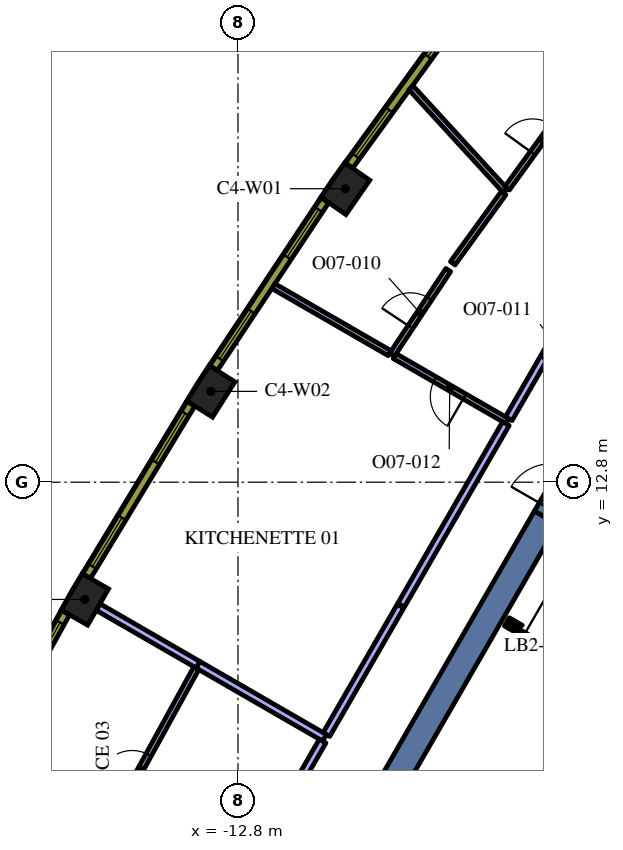
"""IFC4 building model, lengths in metres.
Left out: names, types, materials, properties, quantities, classifications, styles, units other than length and angle.
Written with IfcOpenShell. Run it as: python <this file> out.ifc"""

import sys

from ifc_helpers import new_model, si_unit, direction, frame, frame_2d, origin, origin_2d, place, context, subcontext, project, spatial, polyline, rectangle, outline, extrude, element, fill, save


model = new_model("IFC4")
c1 = context("Model", 3, precision=1e-05, world=origin(), true_north=direction((0.0, 1.0)))
c2 = subcontext(c1, "Body", "Model", "MODEL_VIEW")
j1 = project(units=[si_unit("LENGTHUNIT", "METRE"), si_unit("PLANEANGLEUNIT", "RADIAN")], contexts=[c1])
p1 = place(None, origin())
s1 = spatial("IfcSite", under=j1, at=p1, CompositionType="ELEMENT")
p2 = place(p1, origin())
s2 = spatial("IfcBuilding", under=s1, at=p2, CompositionType="ELEMENT")
p3 = place(p2, frame((0.0, 0.0, 222.6)))
s3 = spatial("IfcBuildingStorey", under=s2, at=p3, CompositionType="ELEMENT", Elevation=222.6)
for number, where, z_axis, x_axis in (
    (1, (-9.975, 20.522, 0.0), (0.0, 0.0, 1.0), (-0.57, -0.822, 0.0)),
    (2, (-13.513, 15.19, 0.0), (0.0, 0.0, 1.0), (-0.536, -0.845, 0.0)),
    (3, (-16.827, 9.715, 0.0), (0.0, 0.0, 1.0), (-0.5, -0.866, 0.0)),
):
    element("IfcColumn", number, at=place(p3, frame(where, z_axis=z_axis, x_axis=x_axis)), inside=s3, PredefinedType="COLUMN", context=c2, shape_type="SweptSolid", body=[
        extrude(rectangle(XDim=1.1, YDim=0.8, at=origin_2d()), origin(), (0.0, 0.0, 1.0), 4.2),
    ])
p4 = place(p3, frame((-12.625, -1.867, 0.0), z_axis=(0.0, 0.0, 1.0), x_axis=(0.500008520515, 0.866020484407, 0.0)))
e4 = element("IfcWall", 4, at=p4, inside=s3, PredefinedType="SOLIDWALL", context=c2, shape_type="SweptSolid", body=[
    extrude(rectangle(XDim=15.859, YDim=0.7, at=frame_2d((7.929, 0.0))), origin(), (0.0, 0.0, 1.0), 4.2),
])
p5 = place(p3, frame((-8.06, -1.311, 0.0), z_axis=(0.0, 0.0, 1.0), x_axis=(0.50000273126, 0.866023826885, 0.0)))
e5 = element("IfcWall", 5, at=p5, inside=s3, PredefinedType="SOLIDWALL", context=c2, shape_type="SweptSolid", body=[
    extrude(rectangle(XDim=10.33, YDim=0.25, at=frame_2d((5.165, 0.0))), origin(), (0.0, 0.0, 1.0), 4.2),
])
p6 = place(p3, frame((-5.725, 9.125, 0.0), z_axis=(0.0, 0.0, 1.0), x_axis=(0.866185586049, -0.49972245349, 0.0)))
e6 = element("IfcWall", 6, at=p6, inside=s3, PredefinedType="SOLIDWALL", context=c2, shape_type="SweptSolid", body=[
    extrude(rectangle(XDim=0.11, YDim=0.25, at=frame_2d((0.055, 0.0))), origin(), (0.0, 0.0, 1.0), 4.2),
])
p7 = place(p3, origin())
e7 = element("IfcWall", 7, at=p7, inside=s3, PredefinedType="SOLIDWALL", context=c2, shape_type="SweptSolid", body=[
    extrude(outline(polyline([(-5.689, 8.96), (-5.69, 8.961), (-5.565, 9.177), (-5.319, 9.035), (-5.335, 9.026), (-5.351, 9.015), (-5.366, 9.002), (-5.379, 8.988), (-5.392, 8.972), (-5.402, 8.956), (-5.412, 8.939), (-5.629, 9.064), (-5.629, 9.064), (-5.689, 8.96)])), origin(), (0.0, 0.0, 1.0), 4.2),
])
p8 = place(p3, frame((-0.898, 6.194, 0.0), z_axis=(0.0, 0.0, 1.0), x_axis=(-0.499996202215, -0.866027596426, 0.0)))
e8 = element("IfcWall", 8, at=p8, inside=s3, PredefinedType="SOLIDWALL", context=c2, shape_type="SweptSolid", body=[
    extrude(rectangle(XDim=9.83, YDim=0.25, at=frame_2d((4.915, 0.0))), origin(), (0.0, 0.0, 1.0), 4.2),
])
p9 = place(p8, frame((0.585, 0.0, 0.0)))
e9 = element("IfcOpeningElement", 9, at=p9, cuts=e8, PredefinedType="OPENING", context=c2, shape_type="SweptSolid", body=[
    extrude(rectangle(XDim=1.1, YDim=2.1, at=frame_2d((0.55, 1.05))), frame((0.0, 0.135, 0.0), z_axis=(0.0, -1.0, 0.0), x_axis=(1.0, 0.0, 0.0)), (0.0, 0.0, 1.0), 0.27),
])
p10 = place(p8, frame((3.105, 0.0, 0.0)))
e10 = element("IfcOpeningElement", 10, at=p10, cuts=e8, PredefinedType="OPENING", context=c2, shape_type="SweptSolid", body=[
    extrude(rectangle(XDim=1.1, YDim=2.1, at=frame_2d((0.55, 1.05))), frame((0.0, 0.135, 0.0), z_axis=(0.0, -1.0, 0.0), x_axis=(1.0, 0.0, 0.0)), (0.0, 0.0, 1.0), 0.27),
])
p11 = place(p8, frame((5.625, 0.0, 0.0)))
e11 = element("IfcOpeningElement", 11, at=p11, cuts=e8, PredefinedType="OPENING", context=c2, shape_type="SweptSolid", body=[
    extrude(rectangle(XDim=1.1, YDim=2.1, at=frame_2d((0.55, 1.05))), frame((0.0, 0.135, 0.0), z_axis=(0.0, -1.0, 0.0), x_axis=(1.0, 0.0, 0.0)), (0.0, 0.0, 1.0), 0.27),
])
p12 = place(p8, frame((8.145, 0.0, 0.0)))
e12 = element("IfcOpeningElement", 12, at=p12, cuts=e8, PredefinedType="OPENING", context=c2, shape_type="SweptSolid", body=[
    extrude(rectangle(XDim=1.1, YDim=2.1, at=frame_2d((0.55, 1.05))), frame((0.0, 0.135, 0.0), z_axis=(0.0, -1.0, 0.0), x_axis=(1.0, 0.0, 0.0)), (0.0, 0.0, 1.0), 0.27),
])
p13 = place(p3, frame((-5.659, 9.012, 0.0), z_axis=(0.0, 0.0, 1.0), x_axis=(0.866009402589, -0.500027713859, 0.0)))
e13 = element("IfcWall", 13, at=p13, inside=s3, PredefinedType="PARTITIONING", context=c2, shape_type="SweptSolid", body=[
    extrude(rectangle(XDim=2.1, YDim=0.12, at=frame_2d((1.05, 0.0))), origin(), (0.0, 0.0, 1.0), 3.45),
])
p14 = place(p13, frame((0.45, 0.0, 0.0)))
e14 = element("IfcOpeningElement", 14, at=p14, cuts=e13, PredefinedType="OPENING", context=c2, shape_type="SweptSolid", body=[
    extrude(rectangle(XDim=1.2, YDim=2.1, at=frame_2d((0.6, 1.05))), frame((0.0, 0.07, 0.0), z_axis=(0.0, -1.0, 0.0), x_axis=(1.0, 0.0, 0.0)), (0.0, 0.0, 1.0), 0.14),
])
p15 = place(p3, frame((-4.696, 11.867, 0.0), z_axis=(0.0, 0.0, 1.0), x_axis=(0.499892348375, 0.866087547558, 0.0)))
e15 = element("IfcWall", 15, at=p15, inside=s3, PredefinedType="SOLIDWALL", context=c2, shape_type="SweptSolid", body=[
    extrude(rectangle(XDim=1.7, YDim=0.7, at=frame_2d((0.85, 0.0))), origin(), (0.0, 0.0, 1.0), 4.2),
])
p16 = place(p15, frame((0.25, 0.0, 0.0)))
e16 = element("IfcOpeningElement", 16, at=p16, cuts=e15, PredefinedType="OPENING", context=c2, shape_type="SweptSolid", body=[
    extrude(rectangle(XDim=1.2, YDim=2.1, at=frame_2d((0.6, 1.05))), frame((0.0, 0.36, 0.0), z_axis=(0.0, -1.0, 0.0), x_axis=(1.0, 0.0, 0.0)), (0.0, 0.0, 1.0), 0.72),
])
p17 = place(p3, frame((-5.764, 20.469, 0.0), z_axis=(0.0, 0.0, 1.0), x_axis=(-0.675673477211, 0.737201025632, 0.0)))
e17 = element("IfcWall", 17, at=p17, inside=s3, PredefinedType="PARTITIONING", context=c2, shape_type="SweptSolid", body=[
    extrude(rectangle(XDim=3.674, YDim=0.15, at=frame_2d((1.837, 0.0))), origin(), (0.0, 0.0, 1.0), 3.45),
])
p18 = place(p3, frame((-5.719, 20.531, 0.0), z_axis=(0.0, 0.0, 1.0), x_axis=(0.586981132734, 0.809600611298, 0.0)))
e18 = element("IfcWall", 18, at=p18, inside=s3, PredefinedType="PARTITIONING", context=c2, shape_type="SweptSolid", body=[
    extrude(rectangle(XDim=3.245, YDim=0.15, at=frame_2d((1.623, 0.0))), origin(), (0.0, 0.0, 1.0), 3.45),
])
p19 = place(p18, frame((1.145, 0.0, 0.0)))
e19 = element("IfcOpeningElement", 19, at=p19, cuts=e18, PredefinedType="OPENING", context=c2, shape_type="SweptSolid", body=[
    extrude(rectangle(XDim=0.9, YDim=2.1, at=frame_2d((0.45, 1.05))), frame((0.0, 0.085, 0.0), z_axis=(0.0, -1.0, 0.0), x_axis=(1.0, 0.0, 0.0)), (0.0, 0.0, 1.0), 0.17),
])
p20 = place(p3, frame((-5.809, 20.407, 0.0), z_axis=(0.0, 0.0, 1.0), x_axis=(-0.587095604593, -0.809517603927, 0.0)))
e20 = element("IfcWall", 20, at=p20, inside=s3, PredefinedType="PARTITIONING", context=c2, shape_type="SweptSolid", body=[
    extrude(rectangle(XDim=2.281, YDim=0.15, at=frame_2d((1.141, 0.0))), origin(), (0.0, 0.0, 1.0), 3.45),
])
p21 = place(p3, frame((-8.744, 16.156, 0.0), z_axis=(0.0, 0.0, 1.0), x_axis=(0.552885218102, 0.833257424572, 0.0)))
e21 = element("IfcWall", 21, at=p21, inside=s3, PredefinedType="PARTITIONING", context=c2, shape_type="SweptSolid", body=[
    extrude(rectangle(XDim=2.672, YDim=0.15, at=frame_2d((1.336, 0.0))), origin(), (0.0, 0.0, 1.0), 3.45),
])
p22 = place(p21, frame((0.872, 0.0, 0.0)))
e22 = element("IfcOpeningElement", 22, at=p22, cuts=e21, PredefinedType="OPENING", context=c2, shape_type="SweptSolid", body=[
    extrude(rectangle(XDim=0.9, YDim=2.1, at=frame_2d((0.45, 1.05))), frame((0.0, 0.085, 0.0), z_axis=(0.0, -1.0, 0.0), x_axis=(1.0, 0.0, 0.0)), (0.0, 0.0, 1.0), 0.17),
])
p23 = place(p3, frame((-8.809, 16.194, 0.0), z_axis=(0.0, 0.0, 1.0), x_axis=(-0.865996792572, 0.500049552799, 0.0)))
e23 = element("IfcWall", 23, at=p23, inside=s3, PredefinedType="PARTITIONING", context=c2, shape_type="SweptSolid", body=[
    extrude(rectangle(XDim=3.532, YDim=0.15, at=frame_2d((1.766, 0.0))), origin(), (0.0, 0.0, 1.0), 3.45),
])
p24 = place(p3, frame((-5.712, 14.406, 0.0), z_axis=(0.0, 0.0, 1.0), x_axis=(-0.866050272892, 0.499956922968, 0.0)))
e24 = element("IfcWall", 24, at=p24, inside=s3, PredefinedType="PARTITIONING", context=c2, shape_type="SweptSolid", body=[
    extrude(rectangle(XDim=3.425, YDim=0.15, at=frame_2d((1.712, 0.0))), origin(), (0.0, 0.0, 1.0), 3.45),
])
p25 = place(p24, frame((1.3, 0.0, 0.0)))
e25 = element("IfcOpeningElement", 25, at=p25, cuts=e24, PredefinedType="OPENING", context=c2, shape_type="SweptSolid", body=[
    extrude(rectangle(XDim=0.9, YDim=2.1, at=frame_2d((0.45, 1.05))), frame((0.0, 0.085, 0.0), z_axis=(0.0, -1.0, 0.0), x_axis=(1.0, 0.0, 0.0)), (0.0, 0.0, 1.0), 0.17),
])
p26 = place(p3, frame((-3.364, 18.474, 0.0), z_axis=(0.0, 0.0, 1.0), x_axis=(-0.500007432598, -0.866021112529, 0.0)))
e26 = element("IfcWall", 26, at=p26, inside=s3, PredefinedType="PARTITIONING", context=c2, shape_type="SweptSolid", body=[
    extrude(rectangle(XDim=4.623, YDim=0.2, at=frame_2d((2.311, 0.0))), origin(), (0.0, 0.0, 1.0), 3.45),
])
p27 = place(p26, frame((1.8, 0.0, 0.0)))
e27 = element("IfcOpeningElement", 27, at=p27, cuts=e26, PredefinedType="OPENING", context=c2, shape_type="SweptSolid", body=[
    extrude(rectangle(XDim=1.0, YDim=2.1, at=frame_2d((0.5, 1.05))), frame((0.0, 0.11, 0.0), z_axis=(0.0, -1.0, 0.0), x_axis=(1.0, 0.0, 0.0)), (0.0, 0.0, 1.0), 0.22),
])
p28 = place(p3, frame((-13.844, 7.993, 0.0), z_axis=(0.0, 0.0, 1.0), x_axis=(-0.866003976688, 0.500037110984, 0.0)))
e28 = element("IfcWall", 28, at=p28, inside=s3, PredefinedType="PARTITIONING", context=c2, shape_type="SweptSolid", body=[
    extrude(rectangle(XDim=3.045, YDim=0.2, at=frame_2d((1.522, 0.0))), origin(), (0.0, 0.0, 1.0), 3.45),
])
p29 = place(p3, frame((-10.522, 6.075, 0.0), z_axis=(0.0, 0.0, 1.0), x_axis=(-0.866002601515, 0.500039492609, 0.0)))
e29 = element("IfcWall", 29, at=p29, inside=s3, PredefinedType="PARTITIONING", context=c2, shape_type="SweptSolid", body=[
    extrude(rectangle(XDim=3.844, YDim=0.2, at=frame_2d((1.922, 0.0))), origin(), (0.0, 0.0, 1.0), 3.45),
])
p30 = place(p3, frame((-8.522, 9.539, 0.0), z_axis=(0.0, 0.0, 1.0), x_axis=(-0.499997012787, -0.866027128446, 0.0)))
e30 = element("IfcWall", 30, at=p30, inside=s3, PredefinedType="PARTITIONING", context=c2, shape_type="SweptSolid", body=[
    extrude(rectangle(XDim=3.9, YDim=0.2, at=frame_2d((1.95, 0.0))), origin(), (0.0, 0.0, 1.0), 3.45),
])
p31 = place(p3, frame((-5.75, 14.341, 0.0), z_axis=(0.0, 0.0, 1.0), x_axis=(-0.499995817524, -0.866027818524, 0.0)))
e31 = element("IfcWall", 31, at=p31, inside=s3, PredefinedType="PARTITIONING", context=c2, shape_type="SweptSolid", body=[
    extrude(rectangle(XDim=5.515, YDim=0.2, at=frame_2d((2.757, 0.0))), origin(), (0.0, 0.0, 1.0), 3.45),
])
p32 = place(p3, frame((-16.863, 2.513, 0.0), z_axis=(0.0, 0.0, 1.0), x_axis=(0.48192483879, 0.876212559689, 0.0)))
e32 = element("IfcWall", 32, at=p32, inside=s3, PredefinedType="PARTITIONING", context=c2, shape_type="SweptSolid", body=[
    extrude(rectangle(XDim=6.157, YDim=0.15, at=frame_2d((3.078, 0.0))), origin(), (0.0, 0.0, 1.0), 3.45),
])
p33 = place(p32, frame((2.657, 0.0, 0.0)))
e33 = element("IfcOpeningElement", 33, at=p33, cuts=e32, PredefinedType="OPENING", context=c2, shape_type="SweptSolid", body=[
    extrude(rectangle(XDim=0.9, YDim=2.1, at=frame_2d((0.45, 1.05))), frame((0.0, 0.085, 0.0), z_axis=(0.0, -1.0, 0.0), x_axis=(1.0, 0.0, 0.0)), (0.0, 0.0, 1.0), 0.17),
])
p34 = place(p3, frame((-10.572, 5.988, 0.0), z_axis=(0.0, 0.0, 1.0), x_axis=(-0.499997012787, -0.866027128446, 0.0)))
e34 = element("IfcWall", 34, at=p34, inside=s3, PredefinedType="PARTITIONING", context=c2, shape_type="SweptSolid", body=[
    extrude(rectangle(XDim=3.9, YDim=0.2, at=frame_2d((1.95, 0.0))), origin(), (0.0, 0.0, 1.0), 3.45),
])
p35 = place(p3, frame((-6.761, 25.432, 0.0), z_axis=(0.0, 0.0, 1.0), x_axis=(-0.586998456641, -0.80958805074, 0.0)))
e35 = element("IfcWall", 35, at=p35, inside=s3, PredefinedType="SOLIDWALL", context=c2, shape_type="SweptSolid", body=[
    extrude(rectangle(XDim=5.311, YDim=0.24, at=frame_2d((2.655, 0.0))), origin(), (0.0, 0.0, 1.0), 3.95),
])
p36 = place(p35, frame((0.271, 0.0, 0.9)))
e36 = element("IfcOpeningElement", 36, at=p36, cuts=e35, PredefinedType="OPENING", context=c2, shape_type="SweptSolid", body=[
    extrude(rectangle(XDim=1.5, YDim=2.55, at=frame_2d((0.75, 1.275))), frame((0.0, 0.13, 0.0), z_axis=(0.0, -1.0, 0.0), x_axis=(1.0, 0.0, 0.0)), (0.0, 0.0, 1.0), 0.26),
])
p37 = place(p35, frame((3.504, 0.0, 0.9)))
e37 = element("IfcOpeningElement", 37, at=p37, cuts=e35, PredefinedType="OPENING", context=c2, shape_type="SweptSolid", body=[
    extrude(rectangle(XDim=1.5, YDim=2.55, at=frame_2d((0.75, 1.275))), frame((0.0, 0.13, 0.0), z_axis=(0.0, -1.0, 0.0), x_axis=(1.0, 0.0, 0.0)), (0.0, 0.0, 1.0), 0.26),
])
p38 = place(p3, frame((-10.513, 20.218, 0.0), z_axis=(0.0, 0.0, 1.0), x_axis=(-0.552901821755, -0.833246407433, 0.0)))
e38 = element("IfcWall", 38, at=p38, inside=s3, PredefinedType="SOLIDWALL", context=c2, shape_type="SweptSolid", body=[
    extrude(rectangle(XDim=5.298, YDim=0.24, at=frame_2d((2.649, 0.0))), origin(), (0.0, 0.0, 1.0), 3.95),
])
p39 = place(p38, frame((0.294, 0.0, 0.9)))
e39 = element("IfcOpeningElement", 39, at=p39, cuts=e38, PredefinedType="OPENING", context=c2, shape_type="SweptSolid", body=[
    extrude(rectangle(XDim=1.5, YDim=2.55, at=frame_2d((0.75, 1.275))), frame((0.0, 0.13, 0.0), z_axis=(0.0, -1.0, 0.0), x_axis=(1.0, 0.0, 0.0)), (0.0, 0.0, 1.0), 0.26),
])
p40 = place(p38, frame((3.504, 0.0, 0.9)))
e40 = element("IfcOpeningElement", 40, at=p40, cuts=e38, PredefinedType="OPENING", context=c2, shape_type="SweptSolid", body=[
    extrude(rectangle(XDim=1.5, YDim=2.55, at=frame_2d((0.75, 1.275))), frame((0.0, 0.13, 0.0), z_axis=(0.0, -1.0, 0.0), x_axis=(1.0, 0.0, 0.0)), (0.0, 0.0, 1.0), 0.26),
])
p41 = place(p3, frame((-14.038, 14.864, 0.0), z_axis=(0.0, 0.0, 1.0), x_axis=(-0.517846166225, -0.855473756538, 0.0)))
e41 = element("IfcWall", 41, at=p41, inside=s3, PredefinedType="SOLIDWALL", context=c2, shape_type="SweptSolid", body=[
    extrude(rectangle(XDim=5.298, YDim=0.24, at=frame_2d((2.649, 0.0))), origin(), (0.0, 0.0, 1.0), 3.95),
])
p42 = place(p41, frame((0.294, 0.0, 0.9)))
e42 = element("IfcOpeningElement", 42, at=p42, cuts=e41, PredefinedType="OPENING", context=c2, shape_type="SweptSolid", body=[
    extrude(rectangle(XDim=1.5, YDim=2.55, at=frame_2d((0.75, 1.275))), frame((0.0, 0.13, 0.0), z_axis=(0.0, -1.0, 0.0), x_axis=(1.0, 0.0, 0.0)), (0.0, 0.0, 1.0), 0.26),
])
p43 = place(p41, frame((3.504, 0.0, 0.9)))
e43 = element("IfcOpeningElement", 43, at=p43, cuts=e41, PredefinedType="OPENING", context=c2, shape_type="SweptSolid", body=[
    extrude(rectangle(XDim=1.5, YDim=2.55, at=frame_2d((0.75, 1.275))), frame((0.0, 0.13, 0.0), z_axis=(0.0, -1.0, 0.0), x_axis=(1.0, 0.0, 0.0)), (0.0, 0.0, 1.0), 0.26),
])
p44 = place(p3, frame((-17.338, 9.368, 0.0), z_axis=(0.0, 0.0, 1.0), x_axis=(-0.481925825015, -0.876212017256, 0.0)))
e44 = element("IfcWall", 44, at=p44, inside=s3, PredefinedType="SOLIDWALL", context=c2, shape_type="SweptSolid", body=[
    extrude(rectangle(XDim=5.299, YDim=0.24, at=frame_2d((2.649, 0.0))), origin(), (0.0, 0.0, 1.0), 3.95),
])
p45 = place(p44, frame((0.295, 0.0, 0.9)))
e45 = element("IfcOpeningElement", 45, at=p45, cuts=e44, PredefinedType="OPENING", context=c2, shape_type="SweptSolid", body=[
    extrude(rectangle(XDim=1.5, YDim=2.55, at=frame_2d((0.75, 1.275))), frame((0.0, 0.13, 0.0), z_axis=(0.0, -1.0, 0.0), x_axis=(1.0, 0.0, 0.0)), (0.0, 0.0, 1.0), 0.26),
])
p46 = place(p44, frame((3.504, 0.0, 0.9)))
e46 = element("IfcOpeningElement", 46, at=p46, cuts=e44, PredefinedType="OPENING", context=c2, shape_type="SweptSolid", body=[
    extrude(rectangle(XDim=1.5, YDim=2.55, at=frame_2d((0.75, 1.275))), frame((0.0, 0.13, 0.0), z_axis=(0.0, -1.0, 0.0), x_axis=(1.0, 0.0, 0.0)), (0.0, 0.0, 1.0), 0.26),
])
p47 = place(p14, origin())
e47 = element("IfcDoor", 47, at=p47, inside=s3, OperationType="SINGLE_SWING_LEFT", PredefinedType="DOOR", context=c2, shape_type="SweptSolid", body=[
    extrude(rectangle(XDim=1.2, YDim=2.1, at=frame_2d((0.6, 1.05))), frame((0.0, 0.025, 0.0), z_axis=(0.0, -1.0, 0.0), x_axis=(1.0, 0.0, 0.0)), (0.0, 0.0, 1.0), 0.05),
])
fill(e14, e47)
p48 = place(p19, origin())
e48 = element("IfcDoor", 48, at=p48, inside=s3, OperationType="SINGLE_SWING_LEFT", PredefinedType="DOOR", context=c2, shape_type="SweptSolid", body=[
    extrude(rectangle(XDim=0.9, YDim=2.1, at=frame_2d((0.45, 1.05))), frame((0.0, 0.025, 0.0), z_axis=(0.0, -1.0, 0.0), x_axis=(1.0, 0.0, 0.0)), (0.0, 0.0, 1.0), 0.05),
])
fill(e19, e48)
p49 = place(p22, origin())
e49 = element("IfcDoor", 49, at=p49, inside=s3, OperationType="SINGLE_SWING_LEFT", PredefinedType="DOOR", context=c2, shape_type="SweptSolid", body=[
    extrude(rectangle(XDim=0.9, YDim=2.1, at=frame_2d((0.45, 1.05))), frame((0.0, 0.025, 0.0), z_axis=(0.0, -1.0, 0.0), x_axis=(1.0, 0.0, 0.0)), (0.0, 0.0, 1.0), 0.05),
])
fill(e22, e49)
p50 = place(p27, origin())
e50 = element("IfcDoor", 50, at=p50, inside=s3, OperationType="SINGLE_SWING_LEFT", PredefinedType="DOOR", context=c2, shape_type="SweptSolid", body=[
    extrude(rectangle(XDim=1.0, YDim=2.1, at=frame_2d((0.5, 1.05))), frame((0.0, 0.025, 0.0), z_axis=(0.0, -1.0, 0.0), x_axis=(1.0, 0.0, 0.0)), (0.0, 0.0, 1.0), 0.05),
])
fill(e27, e50)
p51 = place(p25, origin())
e51 = element("IfcDoor", 51, at=p51, inside=s3, OperationType="SINGLE_SWING_RIGHT", PredefinedType="DOOR", context=c2, shape_type="SweptSolid", body=[
    extrude(rectangle(XDim=0.9, YDim=2.1, at=frame_2d((0.45, 1.05))), frame((0.0, 0.025, 0.0), z_axis=(0.0, -1.0, 0.0), x_axis=(1.0, 0.0, 0.0)), (0.0, 0.0, 1.0), 0.05),
])
fill(e25, e51)
p52 = place(p33, origin())
e52 = element("IfcDoor", 52, at=p52, inside=s3, OperationType="SINGLE_SWING_RIGHT", PredefinedType="DOOR", context=c2, shape_type="SweptSolid", body=[
    extrude(rectangle(XDim=0.9, YDim=2.1, at=frame_2d((0.45, 1.05))), frame((0.0, 0.025, 0.0), z_axis=(0.0, -1.0, 0.0), x_axis=(1.0, 0.0, 0.0)), (0.0, 0.0, 1.0), 0.05),
])
fill(e33, e52)
p53 = place(p36, origin())
e53 = element("IfcWindow", 53, at=p53, inside=s3, PartitioningType="SINGLE_PANEL", PredefinedType="WINDOW", context=c2, shape_type="SweptSolid", body=[
    extrude(rectangle(XDim=1.5, YDim=2.55, at=frame_2d((0.75, 1.275))), frame((0.0, 0.04, 0.0), z_axis=(0.0, -1.0, 0.0), x_axis=(1.0, 0.0, 0.0)), (0.0, 0.0, 1.0), 0.06),
])
fill(e36, e53)
p54 = place(p37, origin())
e54 = element("IfcWindow", 54, at=p54, inside=s3, PartitioningType="SINGLE_PANEL", PredefinedType="WINDOW", context=c2, shape_type="SweptSolid", body=[
    extrude(rectangle(XDim=1.5, YDim=2.55, at=frame_2d((0.75, 1.275))), frame((0.0, 0.04, 0.0), z_axis=(0.0, -1.0, 0.0), x_axis=(1.0, 0.0, 0.0)), (0.0, 0.0, 1.0), 0.06),
])
fill(e37, e54)
p55 = place(p39, origin())
e55 = element("IfcWindow", 55, at=p55, inside=s3, PartitioningType="SINGLE_PANEL", PredefinedType="WINDOW", context=c2, shape_type="SweptSolid", body=[
    extrude(rectangle(XDim=1.5, YDim=2.55, at=frame_2d((0.75, 1.275))), frame((0.0, 0.04, 0.0), z_axis=(0.0, -1.0, 0.0), x_axis=(1.0, 0.0, 0.0)), (0.0, 0.0, 1.0), 0.06),
])
fill(e39, e55)
p56 = place(p40, origin())
e56 = element("IfcWindow", 56, at=p56, inside=s3, PartitioningType="SINGLE_PANEL", PredefinedType="WINDOW", context=c2, shape_type="SweptSolid", body=[
    extrude(rectangle(XDim=1.5, YDim=2.55, at=frame_2d((0.75, 1.275))), frame((0.0, 0.04, 0.0), z_axis=(0.0, -1.0, 0.0), x_axis=(1.0, 0.0, 0.0)), (0.0, 0.0, 1.0), 0.06),
])
fill(e40, e56)
p57 = place(p42, origin())
e57 = element("IfcWindow", 57, at=p57, inside=s3, PartitioningType="SINGLE_PANEL", PredefinedType="WINDOW", context=c2, shape_type="SweptSolid", body=[
    extrude(rectangle(XDim=1.5, YDim=2.55, at=frame_2d((0.75, 1.275))), frame((0.0, 0.04, 0.0), z_axis=(0.0, -1.0, 0.0), x_axis=(1.0, 0.0, 0.0)), (0.0, 0.0, 1.0), 0.06),
])
fill(e42, e57)
p58 = place(p43, origin())
e58 = element("IfcWindow", 58, at=p58, inside=s3, PartitioningType="SINGLE_PANEL", PredefinedType="WINDOW", context=c2, shape_type="SweptSolid", body=[
    extrude(rectangle(XDim=1.5, YDim=2.55, at=frame_2d((0.75, 1.275))), frame((0.0, 0.04, 0.0), z_axis=(0.0, -1.0, 0.0), x_axis=(1.0, 0.0, 0.0)), (0.0, 0.0, 1.0), 0.06),
])
fill(e43, e58)
p59 = place(p45, origin())
e59 = element("IfcWindow", 59, at=p59, inside=s3, PartitioningType="SINGLE_PANEL", PredefinedType="WINDOW", context=c2, shape_type="SweptSolid", body=[
    extrude(rectangle(XDim=1.5, YDim=2.55, at=frame_2d((0.75, 1.275))), frame((0.0, 0.04, 0.0), z_axis=(0.0, -1.0, 0.0), x_axis=(1.0, 0.0, 0.0)), (0.0, 0.0, 1.0), 0.06),
])
fill(e45, e59)
save(model, sys.argv[1])
